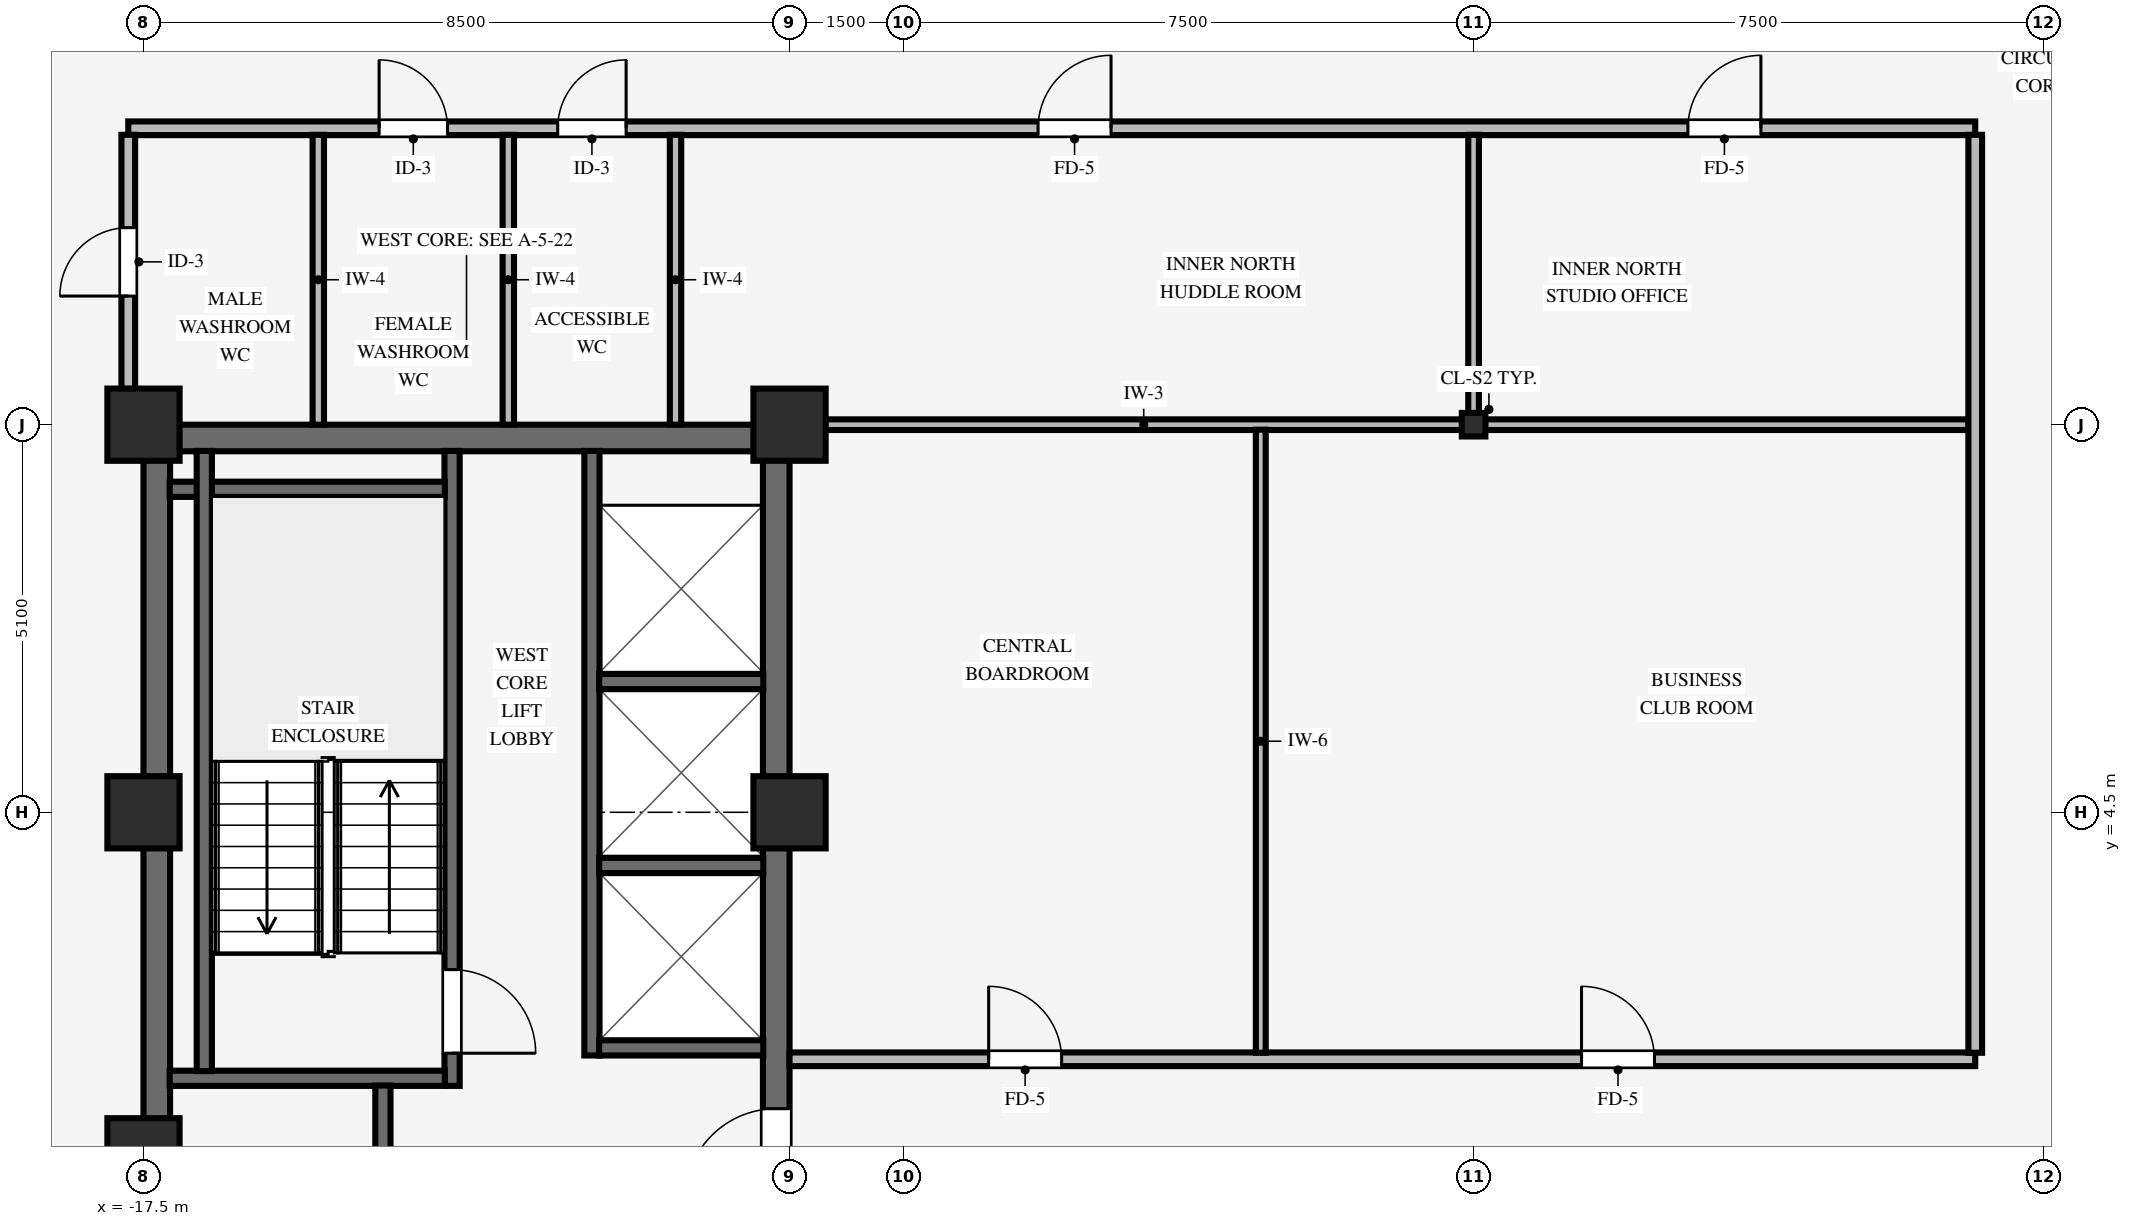
"""IFC4 building model, lengths in metres.
Left out: names, types, materials, properties, quantities, classifications, styles, units other than length and angle.
Written with IfcOpenShell. Run it as: python <this file> out.ifc"""

import sys

from ifc_helpers import new_model, si_unit, direction, frame, frame_2d, origin, origin_2d, place, context, subcontext, project, spatial, rectangle, i_section, extrude, source, transform, mapped, element, fill, save


model = new_model("IFC4")
c1 = context("Model", 3, precision=1e-05, world=origin(), true_north=direction((0.0, 1.0)))
c2 = subcontext(c1, "Body", "Model", "MODEL_VIEW")
j1 = project(units=[si_unit("LENGTHUNIT", "METRE"), si_unit("PLANEANGLEUNIT", "RADIAN")], contexts=[c1])
p1 = place(None, origin())
s1 = spatial("IfcSite", under=j1, at=p1, CompositionType="ELEMENT")
p2 = place(p1, origin())
s2 = spatial("IfcBuilding", under=s1, at=p2, CompositionType="ELEMENT")
p3 = place(p2, frame((0.0, 0.0, 198.2)))
s3 = spatial("IfcBuildingStorey", under=s2, at=p3, CompositionType="ELEMENT", Elevation=198.2)
p4 = place(p3, frame((-17.5, 9.425, 0.0), z_axis=(0.0, 0.0, 1.0), x_axis=(1.0, 0.0, 0.0)))
e1 = element("IfcWall", 1, at=p4, inside=s3, PredefinedType="SHEAR", context=c2, shape_type="SweptSolid", body=[
    extrude(rectangle(XDim=8.5, YDim=0.35, at=frame_2d((4.25, 0.0))), origin(), (0.0, 0.0, 1.0), 3.37),
])
p5 = place(p3, frame((-17.325, -9.255, 0.0), z_axis=(0.0, 0.0, 1.0), x_axis=(0.0, 1.0, 0.0)))
e2 = element("IfcWall", 2, at=p5, inside=s3, PredefinedType="SHEAR", context=c2, shape_type="SweptSolid", body=[
    extrude(rectangle(XDim=18.51, YDim=0.35, at=frame_2d((9.255, 0.0))), origin(), (0.0, 0.0, 1.0), 3.37),
])
p6 = place(p3, frame((-9.175, -9.255, 0.0), z_axis=(0.0, 0.0, 1.0), x_axis=(0.0, 1.0, 0.0)))
e3 = element("IfcWall", 3, at=p6, inside=s3, PredefinedType="SHEAR", context=c2, shape_type="SweptSolid", body=[
    extrude(rectangle(XDim=18.51, YDim=0.35, at=frame_2d((9.255, 0.0))), origin(), (0.0, 0.0, 1.0), 3.37),
])
p7 = place(p6, frame((8.655, 0.0, 0.0)))
e4 = element("IfcOpeningElement", 4, at=p7, cuts=e3, PredefinedType="OPENING", context=c2, shape_type="SweptSolid", body=[
    extrude(rectangle(XDim=1.2, YDim=2.15, at=frame_2d((0.6, 1.075))), frame((0.0, 0.185, 0.0), z_axis=(0.0, -1.0, 0.0), x_axis=(1.0, 0.0, 0.0)), (0.0, 0.0, 1.0), 0.37),
])
for number, where, z_axis, x_axis in (
    (5, (-17.5, 4.5, 0.0), (0.0, 0.0, 1.0), (1.0, 0.0, 0.0)),
    (6, (-17.5, 9.6, 0.0), (0.0, 0.0, 1.0), (1.0, 0.0, 0.0)),
    (7, (-9.0, 4.5, 0.0), (0.0, 0.0, 1.0), (1.0, 0.0, 0.0)),
    (8, (-9.0, 9.6, 0.0), (0.0, 0.0, 1.0), (1.0, 0.0, 0.0)),
    (9, (-17.5, 0.0, 0.0), (0.0, 0.0, 1.0), (1.0, 0.0, 0.0)),
):
    element("IfcColumn", number, at=place(p3, frame(where, z_axis=z_axis, x_axis=x_axis)), inside=s3, PredefinedType="COLUMN", context=c2, shape_type="SweptSolid", body=[
        extrude(rectangle(XDim=0.95, YDim=0.95, at=origin_2d()), origin(), (0.0, 0.0, 1.0), 3.37),
    ])
p8 = place(p3, frame((0.0, 9.6, 0.0), z_axis=(0.0, 0.0, 1.0), x_axis=(1.0, 0.0, 0.0)))
e10 = element("IfcColumn", 10, at=p8, inside=s3, PredefinedType="COLUMN", context=c2, shape_type="SweptSolid", body=[
    extrude(i_section(OverallWidth=0.31, OverallDepth=0.31, WebThickness=0.015, FlangeThickness=0.015, FilletRadius=0.015, at=origin_2d()), origin(), (0.0, 0.0, 1.0), 3.37),
])
p9 = place(p3, frame((-13.44, 0.9, 0.0), z_axis=(0.0, 0.0, 1.0), x_axis=(0.0, 1.0, 0.0)))
e11 = element("IfcWall", 11, at=p9, inside=s3, PredefinedType="SHEAR", context=c2, shape_type="SweptSolid", body=[
    extrude(rectangle(XDim=8.355, YDim=0.2, at=frame_2d((4.177, 0.0))), origin(), (0.0, 0.0, 1.0), 3.37),
])
p10 = place(p9, frame((1.53, 0.0, 0.0), z_axis=(0.0, 0.0, 1.0), x_axis=(-1.0, 0.0, 0.0)))
e12 = element("IfcOpeningElement", 12, at=p10, cuts=e11, PredefinedType="OPENING", context=c2, shape_type="SweptSolid", body=[
    extrude(rectangle(XDim=1.1, YDim=2.15, at=frame_2d((0.55, 1.075))), frame((0.0, 0.11, 0.0), z_axis=(0.0, -1.0, 0.0), x_axis=(1.0, 0.0, 0.0)), (0.0, 0.0, 1.0), 0.22),
])
for number, where, z_axis, x_axis in (
    (13, (-17.155, 1.0, 0.0), (0.0, 0.0, 1.0), (1.0, 0.0, 0.0)),
    (14, (-17.155, 8.75, 0.0), (0.0, 0.0, 1.0), (1.0, 0.0, 0.0)),
):
    element("IfcWall", number, at=place(p3, frame(where, z_axis=z_axis, x_axis=x_axis)), inside=s3, PredefinedType="SHEAR", context=c2, shape_type="SweptSolid", body=[
        extrude(rectangle(XDim=3.62, YDim=0.2, at=frame_2d((1.81, 0.0))), origin(), (0.0, 0.0, 1.0), 3.37),
    ])
p11 = place(p3, frame((-16.7, 1.095, 0.0), z_axis=(0.0, 0.0, 1.0), x_axis=(0.0, 1.0, 0.0)))
e15 = element("IfcWall", 15, at=p11, inside=s3, PredefinedType="SHEAR", context=c2, shape_type="SweptSolid", body=[
    extrude(rectangle(XDim=8.16, YDim=0.2, at=frame_2d((4.08, 0.0))), origin(), (0.0, 0.0, 1.0), 3.37),
])
p12 = place(p3, frame((-14.35, -6.2, 0.0), z_axis=(0.0, 0.0, 1.0), x_axis=(0.0, 1.0, 0.0)))
e16 = element("IfcWall", 16, at=p12, inside=s3, PredefinedType="SHEAR", context=c2, shape_type="SweptSolid", body=[
    extrude(rectangle(XDim=7.105, YDim=0.2, at=frame_2d((3.552, 0.0))), origin(), (0.0, 0.0, 1.0), 3.37),
])
p13 = place(p12, frame((5.69, 0.0, 0.0), z_axis=(0.0, 0.0, 1.0), x_axis=(-1.0, 0.0, 0.0)))
e17 = element("IfcOpeningElement", 17, at=p13, cuts=e16, PredefinedType="OPENING", context=c2, shape_type="SweptSolid", body=[
    extrude(rectangle(XDim=0.88, YDim=2.1, at=frame_2d((0.44, 1.05))), frame((0.0, 0.11, 0.0), z_axis=(0.0, -1.0, 0.0), x_axis=(1.0, 0.0, 0.0)), (0.0, 0.0, 1.0), 0.22),
])
p14 = place(p12, frame((1.15, 0.0, 0.0)))
e18 = element("IfcOpeningElement", 18, at=p14, cuts=e16, PredefinedType="OPENING", context=c2, shape_type="SweptSolid", body=[
    extrude(rectangle(XDim=1.3, YDim=2.2, at=frame_2d((0.65, 1.1))), frame((0.0, 0.11, 0.0), z_axis=(0.0, -1.0, 0.0), x_axis=(1.0, 0.0, 0.0)), (0.0, 0.0, 1.0), 0.22),
])
p15 = place(p3, frame((-11.6, 1.3, 0.0), z_axis=(0.0, 0.0, 1.0), x_axis=(0.0, 1.0, 0.0)))
e19 = element("IfcWall", 19, at=p15, inside=s3, PredefinedType="SHEAR", context=c2, shape_type="SweptSolid", body=[
    extrude(rectangle(XDim=7.955, YDim=0.2, at=frame_2d((3.978, 0.0))), origin(), (0.0, 0.0, 1.0), 3.37),
])
for number, where, z_axis, x_axis in (
    (20, (-11.505, 1.4, 0.0), (0.0, 0.0, 1.0), (1.0, 0.0, 0.0)),
    (21, (-11.505, 3.8, 0.0), (0.0, 0.0, 1.0), (1.0, 0.0, 0.0)),
    (22, (-11.505, 6.22, 0.0), (0.0, 0.0, 1.0), (1.0, 0.0, 0.0)),
):
    element("IfcWall", number, at=place(p3, frame(where, z_axis=z_axis, x_axis=x_axis)), inside=s3, PredefinedType="SHEAR", context=c2, shape_type="SweptSolid", body=[
        extrude(rectangle(XDim=2.16, YDim=0.2, at=frame_2d((1.08, 0.0))), origin(), (0.0, 0.0, 1.0), 3.37),
    ])
p16 = place(p3, frame((-9.0, 1.25, 0.0), z_axis=(0.0, 0.0, 1.0), x_axis=(1.0, 0.0, 0.0)))
e23 = element("IfcWall", 23, at=p16, inside=s3, PredefinedType="PARTITIONING", context=c2, shape_type="SweptSolid", body=[
    extrude(rectangle(XDim=15.6, YDim=0.18, at=frame_2d((7.8, 0.0))), origin(), (0.0, 0.0, 1.0), 3.36),
])
p17 = place(p16, frame((10.42, 0.0, 0.0)))
e24 = element("IfcOpeningElement", 24, at=p17, cuts=e23, PredefinedType="OPENING", context=c2, shape_type="SweptSolid", body=[
    extrude(rectangle(XDim=0.96, YDim=2.1, at=frame_2d((0.48, 1.05))), frame((0.0, 0.1, 0.0), z_axis=(0.0, -1.0, 0.0), x_axis=(1.0, 0.0, 0.0)), (0.0, 0.0, 1.0), 0.2),
])
p18 = place(p16, frame((2.62, 0.0, 0.0)))
e25 = element("IfcOpeningElement", 25, at=p18, cuts=e23, PredefinedType="OPENING", context=c2, shape_type="SweptSolid", body=[
    extrude(rectangle(XDim=0.96, YDim=2.1, at=frame_2d((0.48, 1.05))), frame((0.0, 0.1, 0.0), z_axis=(0.0, -1.0, 0.0), x_axis=(1.0, 0.0, 0.0)), (0.0, 0.0, 1.0), 0.2),
])
p19 = place(p3, frame((-8.529, 9.6, 0.0), z_axis=(0.0, 0.0, 1.0), x_axis=(1.0, 0.0, 0.0)))
e26 = element("IfcWall", 26, at=p19, inside=s3, PredefinedType="PARTITIONING", context=c2, shape_type="SweptSolid", body=[
    extrude(rectangle(XDim=8.378, YDim=0.14, at=frame_2d((4.189, 0.0))), origin(), (0.0, 0.0, 1.0), 2.405),
])
p20 = place(p3, frame((0.151, 9.6, 0.0), z_axis=(0.0, 0.0, 1.0), x_axis=(1.0, 0.0, 0.0)))
e27 = element("IfcWall", 27, at=p20, inside=s3, PredefinedType="PARTITIONING", context=c2, shape_type="SweptSolid", body=[
    extrude(rectangle(XDim=6.363, YDim=0.14, at=frame_2d((3.182, 0.0))), origin(), (0.0, 0.0, 1.0), 2.405),
])
p21 = place(p3, frame((-17.7, 13.5, 0.0), z_axis=(0.0, 0.0, 1.0), x_axis=(1.0, 0.0, 0.0)))
e28 = element("IfcWall", 28, at=p21, inside=s3, PredefinedType="PARTITIONING", context=c2, shape_type="SweptSolid", body=[
    extrude(rectangle(XDim=24.3, YDim=0.18, at=frame_2d((12.15, 0.0))), origin(), (0.0, 0.0, 1.0), 3.008),
])
p22 = place(p21, frame((11.97, 0.0, 0.0)))
e29 = element("IfcOpeningElement", 29, at=p22, cuts=e28, PredefinedType="OPENING", context=c2, shape_type="SweptSolid", body=[
    extrude(rectangle(XDim=0.96, YDim=2.1, at=frame_2d((0.48, 1.05))), frame((0.0, 0.1, 0.0), z_axis=(0.0, -1.0, 0.0), x_axis=(1.0, 0.0, 0.0)), (0.0, 0.0, 1.0), 0.2),
])
p23 = place(p21, frame((20.52, 0.0, 0.0)))
e30 = element("IfcOpeningElement", 30, at=p23, cuts=e28, PredefinedType="OPENING", context=c2, shape_type="SweptSolid", body=[
    extrude(rectangle(XDim=0.96, YDim=2.1, at=frame_2d((0.48, 1.05))), frame((0.0, 0.1, 0.0), z_axis=(0.0, -1.0, 0.0), x_axis=(1.0, 0.0, 0.0)), (0.0, 0.0, 1.0), 0.2),
])
p24 = place(p21, frame((3.3, 0.0, 0.0)))
e31 = element("IfcOpeningElement", 31, at=p24, cuts=e28, PredefinedType="OPENING", context=c2, shape_type="SweptSolid", body=[
    extrude(rectangle(XDim=0.9, YDim=2.1, at=frame_2d((0.45, 1.05))), frame((0.0, 0.1, 0.0), z_axis=(0.0, -1.0, 0.0), x_axis=(1.0, 0.0, 0.0)), (0.0, 0.0, 1.0), 0.2),
])
p25 = place(p21, frame((5.65, 0.0, 0.0)))
e32 = element("IfcOpeningElement", 32, at=p25, cuts=e28, PredefinedType="OPENING", context=c2, shape_type="SweptSolid", body=[
    extrude(rectangle(XDim=0.9, YDim=2.1, at=frame_2d((0.45, 1.05))), frame((0.0, 0.1, 0.0), z_axis=(0.0, -1.0, 0.0), x_axis=(1.0, 0.0, 0.0)), (0.0, 0.0, 1.0), 0.2),
])
p26 = place(p3, frame((-17.7, 10.071, 0.0), z_axis=(0.0, 0.0, 1.0), x_axis=(0.0, 1.0, 0.0)))
e33 = element("IfcWall", 33, at=p26, inside=s3, PredefinedType="PARTITIONING", context=c2, shape_type="SweptSolid", body=[
    extrude(rectangle(XDim=3.343, YDim=0.18, at=frame_2d((1.671, 0.0))), origin(), (0.0, 0.0, 1.0), 2.816),
])
p27 = place(p26, frame((1.221, 0.0, 0.0)))
e34 = element("IfcOpeningElement", 34, at=p27, cuts=e33, PredefinedType="OPENING", context=c2, shape_type="SweptSolid", body=[
    extrude(rectangle(XDim=0.9, YDim=2.1, at=frame_2d((0.45, 1.05))), frame((0.0, 0.1, 0.0), z_axis=(0.0, -1.0, 0.0), x_axis=(1.0, 0.0, 0.0)), (0.0, 0.0, 1.0), 0.2),
])
for number, where, z_axis, x_axis in (
    (35, (-15.2, 9.6, 0.0), (0.0, 0.0, 1.0), (0.0, 1.0, 0.0)),
    (36, (-12.7, 9.6, 0.0), (0.0, 0.0, 1.0), (0.0, 1.0, 0.0)),
    (37, (-10.5, 9.6, 0.0), (0.0, 0.0, 1.0), (0.0, 1.0, 0.0)),
):
    element("IfcWall", number, at=place(p3, frame(where, z_axis=z_axis, x_axis=x_axis)), inside=s3, PredefinedType="PARTITIONING", context=c2, shape_type="SweptSolid", body=[
        extrude(rectangle(XDim=3.814, YDim=0.15, at=frame_2d((1.907, 0.0))), origin(), (0.0, 0.0, 1.0), 3.36),
    ])
p28 = place(p3, frame((-2.8, 1.336, 0.0), z_axis=(0.0, 0.0, 1.0), x_axis=(0.0, 1.0, 0.0)))
e38 = element("IfcWall", 38, at=p28, inside=s3, PredefinedType="PARTITIONING", context=c2, shape_type="SweptSolid", body=[
    extrude(rectangle(XDim=8.198, YDim=0.13, at=frame_2d((4.099, 0.0))), origin(), (0.0, 0.0, 1.0), 3.36),
])
p29 = place(p3, frame((0.0, 9.751, 0.0), z_axis=(0.0, 0.0, 1.0), x_axis=(0.0, 1.0, 0.0)))
e39 = element("IfcWall", 39, at=p29, inside=s3, PredefinedType="PARTITIONING", context=c2, shape_type="SweptSolid", body=[
    extrude(rectangle(XDim=3.663, YDim=0.14, at=frame_2d((1.832, 0.0))), origin(), (0.0, 0.0, 1.0), 2.816),
])
p30 = place(p3, frame((6.6, 1.336, 0.0), z_axis=(0.0, 0.0, 1.0), x_axis=(0.0, 1.0, 0.0)))
e40 = element("IfcWall", 40, at=p30, inside=s3, PredefinedType="PARTITIONING", context=c2, shape_type="SweptSolid", body=[
    extrude(rectangle(XDim=12.078, YDim=0.18, at=frame_2d((6.039, 0.0))), origin(), (0.0, 0.0, 1.0), 3.36),
])
m1 = source(origin(), c2, "Body", "SweptSolid", [
    extrude(rectangle(XDim=1.1, YDim=2.15, at=frame_2d((0.55, 1.075))), frame((0.0, 0.025, 0.0), z_axis=(0.0, -1.0, 0.0), x_axis=(1.0, 0.0, 0.0)), (0.0, 0.0, 1.0), 0.05),
])
p31 = place(p10, origin())
e41 = element("IfcDoor", 41, at=p31, inside=s3, OperationType="SINGLE_SWING_RIGHT", PredefinedType="DOOR", context=c2, shape_type="MappedRepresentation", body=[
    mapped(m1, transform((0.0, 0.0, 0.0), scale=1.0)),
])
fill(e12, e41)
m2 = source(origin(), c2, "Body", "SweptSolid", [
    extrude(rectangle(XDim=1.2, YDim=2.15, at=frame_2d((0.6, 1.075))), frame((0.0, 0.025, 0.0), z_axis=(0.0, -1.0, 0.0), x_axis=(1.0, 0.0, 0.0)), (0.0, 0.0, 1.0), 0.05),
])
p32 = place(p7, origin())
e42 = element("IfcDoor", 42, at=p32, inside=s3, OperationType="SINGLE_SWING_LEFT", PredefinedType="DOOR", context=c2, shape_type="MappedRepresentation", body=[
    mapped(m2, transform((0.0, 0.0, 0.0), scale=1.0)),
])
fill(e4, e42)
m3 = source(origin(), c2, "Body", "SweptSolid", [
    extrude(rectangle(XDim=0.96, YDim=2.1, at=frame_2d((0.48, 1.05))), frame((0.0, 0.025, 0.0), z_axis=(0.0, -1.0, 0.0), x_axis=(1.0, 0.0, 0.0)), (0.0, 0.0, 1.0), 0.05),
])
p33 = place(p22, origin())
e43 = element("IfcDoor", 43, at=p33, inside=s3, OperationType="SINGLE_SWING_RIGHT", PredefinedType="DOOR", context=c2, shape_type="MappedRepresentation", body=[
    mapped(m3, transform((0.0, 0.0, 0.0), scale=1.0)),
])
fill(e29, e43)
p34 = place(p17, origin())
e44 = element("IfcDoor", 44, at=p34, inside=s3, OperationType="SINGLE_SWING_LEFT", PredefinedType="DOOR", context=c2, shape_type="MappedRepresentation", body=[
    mapped(m3, transform((0.0, 0.0, 0.0), scale=1.0)),
])
fill(e24, e44)
p35 = place(p23, origin())
e45 = element("IfcDoor", 45, at=p35, inside=s3, OperationType="SINGLE_SWING_RIGHT", PredefinedType="DOOR", context=c2, shape_type="MappedRepresentation", body=[
    mapped(m3, transform((0.0, 0.0, 0.0), scale=1.0)),
])
fill(e30, e45)
p36 = place(p18, origin())
e46 = element("IfcDoor", 46, at=p36, inside=s3, OperationType="SINGLE_SWING_LEFT", PredefinedType="DOOR", context=c2, shape_type="MappedRepresentation", body=[
    mapped(m3, transform((0.0, 0.0, 0.0), scale=1.0)),
])
fill(e25, e46)
m4 = source(origin(), c2, "Body", "SweptSolid", [
    extrude(rectangle(XDim=0.9, YDim=2.1, at=frame_2d((0.45, 1.05))), frame((0.0, 0.025, 0.0), z_axis=(0.0, -1.0, 0.0), x_axis=(1.0, 0.0, 0.0)), (0.0, 0.0, 1.0), 0.05),
])
p37 = place(p27, origin())
e47 = element("IfcDoor", 47, at=p37, inside=s3, OperationType="SINGLE_SWING_LEFT", PredefinedType="DOOR", context=c2, shape_type="MappedRepresentation", body=[
    mapped(m4, transform((0.0, 0.0, 0.0), scale=1.0)),
])
fill(e34, e47)
p38 = place(p24, origin())
e48 = element("IfcDoor", 48, at=p38, inside=s3, OperationType="SINGLE_SWING_LEFT", PredefinedType="DOOR", context=c2, shape_type="MappedRepresentation", body=[
    mapped(m4, transform((0.0, 0.0, 0.0), scale=1.0)),
])
fill(e31, e48)
p39 = place(p25, origin())
e49 = element("IfcDoor", 49, at=p39, inside=s3, OperationType="SINGLE_SWING_RIGHT", PredefinedType="DOOR", context=c2, shape_type="MappedRepresentation", body=[
    mapped(m4, transform((0.0, 0.0, 0.0), scale=1.0)),
])
fill(e32, e49)
save(model, sys.argv[1])
